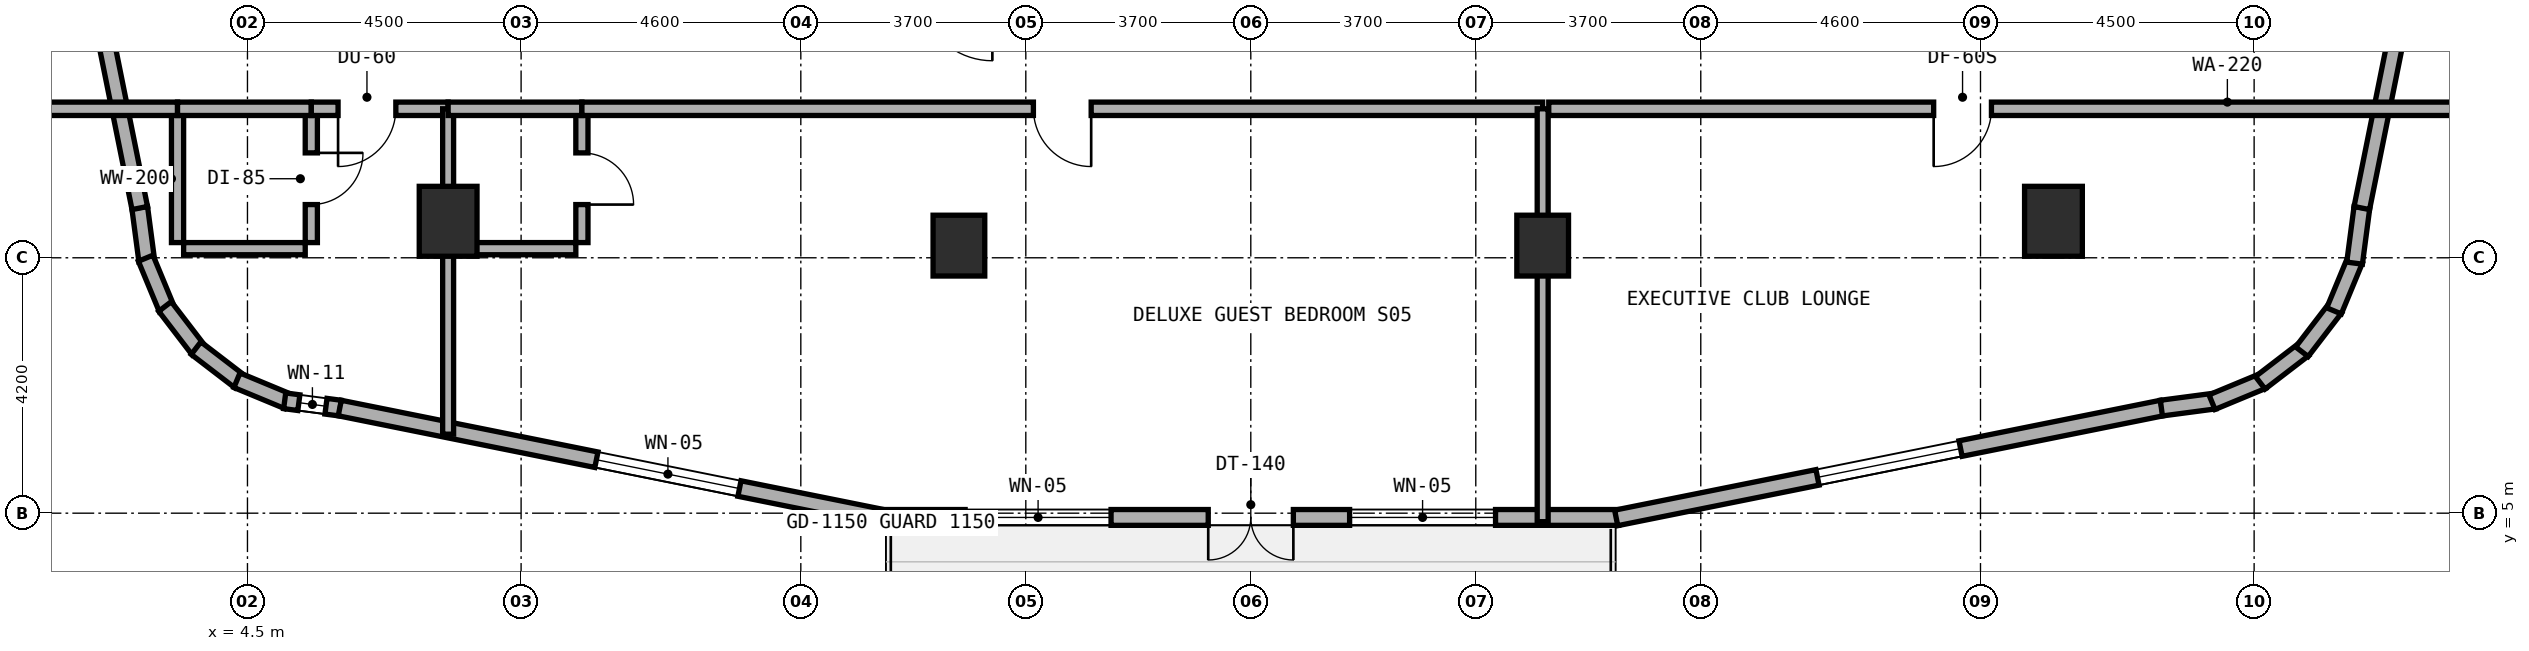
"""IFC4 building model, lengths in metres.
Left out: names, types, materials, properties, quantities, classifications, styles, units other than length and angle.
Written with IfcOpenShell. Run it as: python <this file> out.ifc"""

import sys

from ifc_helpers import new_model, si_unit, direction, frame, frame_2d, origin, origin_2d, place, context, subcontext, project, spatial, rectangle, extrude, element, fill, save


model = new_model("IFC4")
c1 = context("Model", 3, precision=1e-05, world=origin(), true_north=direction((0.0, 1.0)))
c2 = subcontext(c1, "Body", "Model", "MODEL_VIEW")
j1 = project(units=[si_unit("LENGTHUNIT", "METRE"), si_unit("PLANEANGLEUNIT", "RADIAN")], contexts=[c1])
p1 = place(None, origin())
s1 = spatial("IfcSite", under=j1, at=p1, CompositionType="ELEMENT")
p2 = place(p1, origin())
s2 = spatial("IfcBuilding", under=s1, at=p2, CompositionType="ELEMENT")
p3 = place(p2, frame((0.0, 0.0, 95.0)))
s3 = spatial("IfcBuildingStorey", under=s2, at=p3, CompositionType="ELEMENT", Elevation=95.0)
for number, where, z_axis, x_axis in (
    (1, (16.2, 9.4, 0.0), (0.0, 0.0, 1.0), (1.0, 0.0, 0.0)),
    (2, (25.8, 9.4, 0.0), (0.0, 0.0, 1.0), (1.0, 0.0, 0.0)),
):
    element("IfcColumn", number, at=place(p3, frame(where, z_axis=z_axis, x_axis=x_axis)), inside=s3, PredefinedType="COLUMN", context=c2, shape_type="SweptSolid", body=[
        extrude(rectangle(XDim=0.85, YDim=1.0, at=origin_2d()), origin(), (0.0, 0.0, 1.0), 3.5),
    ])
for number, where, z_axis, x_axis in (
    (3, (7.8, 9.8, 0.0), (0.0, 0.0, 1.0), (1.0, 0.0, 0.0)),
    (4, (34.2, 9.8, 0.0), (0.0, 0.0, 1.0), (1.0, 0.0, 0.0)),
):
    element("IfcColumn", number, at=place(p3, frame(where, z_axis=z_axis, x_axis=x_axis)), inside=s3, PredefinedType="COLUMN", context=c2, shape_type="SweptSolid", body=[
        extrude(rectangle(XDim=0.95, YDim=1.15, at=origin_2d()), origin(), (0.0, 0.0, 1.0), 3.5),
    ])
p4 = place(p3, frame((2.728, 10.025, 0.0), z_axis=(0.0, 0.0, 1.0), x_axis=(0.130953706898, -0.991388484223, 0.0)))
e5 = element("IfcWall", 5, at=p4, inside=s3, PredefinedType="STANDARD", context=c2, shape_type="SweptSolid", body=[
    extrude(rectangle(XDim=0.885, YDim=0.26, at=frame_2d((0.443, 0.0))), origin(), (0.0, 0.0, 1.0), 3.22),
])
p5 = place(p3, frame((2.826, 9.193, 0.0), z_axis=(0.0, 0.0, 1.0), x_axis=(0.383290660547, -0.923627776508, 0.0)))
e6 = element("IfcWall", 6, at=p5, inside=s3, PredefinedType="STANDARD", context=c2, shape_type="SweptSolid", body=[
    extrude(rectangle(XDim=0.903, YDim=0.26, at=frame_2d((0.452, 0.0))), origin(), (0.0, 0.0, 1.0), 3.22),
])
p6 = place(p3, frame((3.144, 8.399, 0.0), z_axis=(0.0, 0.0, 1.0), x_axis=(0.608624690463, -0.793458244748, 0.0)))
e7 = element("IfcWall", 7, at=p6, inside=s3, PredefinedType="STANDARD", context=c2, shape_type="SweptSolid", body=[
    extrude(rectangle(XDim=0.902, YDim=0.26, at=frame_2d((0.451, 0.0))), origin(), (0.0, 0.0, 1.0), 3.22),
])
p7 = place(p3, frame((3.655, 7.714, 0.0), z_axis=(0.0, 0.0, 1.0), x_axis=(0.793558456666, -0.608494022858, 0.0)))
e8 = element("IfcWall", 8, at=p7, inside=s3, PredefinedType="STANDARD", context=c2, shape_type="SweptSolid", body=[
    extrude(rectangle(XDim=0.902, YDim=0.26, at=frame_2d((0.451, 0.0))), origin(), (0.0, 0.0, 1.0), 3.22),
])
p8 = place(p3, frame((4.327, 7.186, 0.0), z_axis=(0.0, 0.0, 1.0), x_axis=(0.923683767999, -0.383155708213, 0.0)))
e9 = element("IfcWall", 9, at=p8, inside=s3, PredefinedType="STANDARD", context=c2, shape_type="SweptSolid", body=[
    extrude(rectangle(XDim=0.903, YDim=0.26, at=frame_2d((0.451, 0.0))), origin(), (0.0, 0.0, 1.0), 3.22),
])
p9 = place(p3, frame((5.112, 6.848, 0.0), z_axis=(0.0, 0.0, 1.0), x_axis=(0.991487658083, -0.130200706103, 0.0)))
e10 = element("IfcWall", 10, at=p9, inside=s3, PredefinedType="STANDARD", context=c2, shape_type="SweptSolid", body=[
    extrude(rectangle(XDim=0.921, YDim=0.26, at=frame_2d((0.46, 0.0))), origin(), (0.0, 0.0, 1.0), 3.22),
])
p10 = place(p9, frame((0.235, 0.0, 0.85)))
e11 = element("IfcOpeningElement", 11, at=p10, cuts=e10, PredefinedType="OPENING", context=c2, shape_type="SweptSolid", body=[
    extrude(rectangle(XDim=0.45, YDim=1.5, at=frame_2d((0.225, 0.75))), frame((0.0, 0.14, 0.0), z_axis=(0.0, -1.0, 0.0), x_axis=(1.0, 0.0, 0.0)), (0.0, 0.0, 1.0), 0.28),
])
p11 = place(p3, frame((6.018, 6.729, 0.0), z_axis=(0.0, 0.0, 1.0), x_axis=(0.980317172899, -0.197429077186, 0.0)))
e12 = element("IfcWall", 12, at=p11, inside=s3, PredefinedType="STANDARD", context=c2, shape_type="SweptSolid", body=[
    extrude(rectangle(XDim=9.117, YDim=0.26, at=frame_2d((4.559, 0.0))), origin(), (0.0, 0.0, 1.0), 3.22),
])
p12 = place(p11, frame((4.305, 0.0, 0.8)))
e13 = element("IfcOpeningElement", 13, at=p12, cuts=e12, PredefinedType="OPENING", context=c2, shape_type="SweptSolid", body=[
    extrude(rectangle(XDim=2.4, YDim=1.6, at=frame_2d((1.2, 0.8))), frame((0.0, 0.14, 0.0), z_axis=(0.0, -1.0, 0.0), x_axis=(1.0, 0.0, 0.0)), (0.0, 0.0, 1.0), 0.28),
])
p13 = place(p3, frame((14.915, 4.93, 0.0), z_axis=(0.0, 0.0, 1.0), x_axis=(1.0, 0.0, 0.0)))
e14 = element("IfcWall", 14, at=p13, inside=s3, PredefinedType="STANDARD", context=c2, shape_type="SweptSolid", body=[
    extrude(rectangle(XDim=12.135, YDim=0.26, at=frame_2d((6.067, 0.0))), origin(), (0.0, 0.0, 1.0), 3.22),
])
p14 = place(p13, frame((5.385, 0.0, 0.0)))
e15 = element("IfcOpeningElement", 15, at=p14, cuts=e14, PredefinedType="OPENING", context=c2, shape_type="SweptSolid", body=[
    extrude(rectangle(XDim=1.4, YDim=2.15, at=frame_2d((0.7, 1.075))), frame((0.0, 0.14, 0.0), z_axis=(0.0, -1.0, 0.0), x_axis=(1.0, 0.0, 0.0)), (0.0, 0.0, 1.0), 0.28),
])
p15 = place(p13, frame((1.387, 0.0, 0.8)))
e16 = element("IfcOpeningElement", 16, at=p15, cuts=e14, PredefinedType="OPENING", context=c2, shape_type="SweptSolid", body=[
    extrude(rectangle(XDim=2.4, YDim=1.6, at=frame_2d((1.2, 0.8))), frame((0.0, 0.14, 0.0), z_axis=(0.0, -1.0, 0.0), x_axis=(1.0, 0.0, 0.0)), (0.0, 0.0, 1.0), 0.28),
])
p16 = place(p13, frame((7.71, 0.0, 0.8)))
e17 = element("IfcOpeningElement", 17, at=p16, cuts=e14, PredefinedType="OPENING", context=c2, shape_type="SweptSolid", body=[
    extrude(rectangle(XDim=2.4, YDim=1.6, at=frame_2d((1.2, 0.8))), frame((0.0, 0.14, 0.0), z_axis=(0.0, -1.0, 0.0), x_axis=(1.0, 0.0, 0.0)), (0.0, 0.0, 1.0), 0.28),
])
p17 = place(p3, frame((27.009, 4.922, 0.0), z_axis=(0.0, 0.0, 1.0), x_axis=(0.980321298532, 0.197408590603, 0.0)))
e18 = element("IfcWall", 18, at=p17, inside=s3, PredefinedType="STANDARD", context=c2, shape_type="SweptSolid", body=[
    extrude(rectangle(XDim=9.153, YDim=0.26, at=frame_2d((4.577, 0.0))), origin(), (0.0, 0.0, 1.0), 3.22),
])
p18 = place(p17, frame((3.377, 0.0, 0.8)))
e19 = element("IfcOpeningElement", 19, at=p18, cuts=e18, PredefinedType="OPENING", context=c2, shape_type="SweptSolid", body=[
    extrude(rectangle(XDim=2.4, YDim=1.6, at=frame_2d((1.2, 0.8))), frame((0.0, 0.14, 0.0), z_axis=(0.0, -1.0, 0.0), x_axis=(1.0, 0.0, 0.0)), (0.0, 0.0, 1.0), 0.28),
])
p19 = place(p3, frame((35.975, 6.728, 0.0), z_axis=(0.0, 0.0, 1.0), x_axis=(0.991388484223, 0.130953706898, 0.0)))
e20 = element("IfcWall", 20, at=p19, inside=s3, PredefinedType="STANDARD", context=c2, shape_type="SweptSolid", body=[
    extrude(rectangle(XDim=0.885, YDim=0.26, at=frame_2d((0.443, 0.0))), origin(), (0.0, 0.0, 1.0), 3.22),
])
p20 = place(p3, frame((36.807, 6.826, 0.0), z_axis=(0.0, 0.0, 1.0), x_axis=(0.923627776508, 0.383290660547, 0.0)))
e21 = element("IfcWall", 21, at=p20, inside=s3, PredefinedType="STANDARD", context=c2, shape_type="SweptSolid", body=[
    extrude(rectangle(XDim=0.903, YDim=0.26, at=frame_2d((0.452, 0.0))), origin(), (0.0, 0.0, 1.0), 3.22),
])
p21 = place(p3, frame((37.601, 7.144, 0.0), z_axis=(0.0, 0.0, 1.0), x_axis=(0.793458244748, 0.608624690463, 0.0)))
e22 = element("IfcWall", 22, at=p21, inside=s3, PredefinedType="STANDARD", context=c2, shape_type="SweptSolid", body=[
    extrude(rectangle(XDim=0.902, YDim=0.26, at=frame_2d((0.451, 0.0))), origin(), (0.0, 0.0, 1.0), 3.22),
])
p22 = place(p3, frame((38.286, 7.655, 0.0), z_axis=(0.0, 0.0, 1.0), x_axis=(0.608494022858, 0.793558456666, 0.0)))
e23 = element("IfcWall", 23, at=p22, inside=s3, PredefinedType="STANDARD", context=c2, shape_type="SweptSolid", body=[
    extrude(rectangle(XDim=0.902, YDim=0.26, at=frame_2d((0.451, 0.0))), origin(), (0.0, 0.0, 1.0), 3.22),
])
p23 = place(p3, frame((38.814, 8.327, 0.0), z_axis=(0.0, 0.0, 1.0), x_axis=(0.383155708213, 0.923683767999, 0.0)))
e24 = element("IfcWall", 24, at=p23, inside=s3, PredefinedType="STANDARD", context=c2, shape_type="SweptSolid", body=[
    extrude(rectangle(XDim=0.903, YDim=0.26, at=frame_2d((0.451, 0.0))), origin(), (0.0, 0.0, 1.0), 3.22),
])
p24 = place(p3, frame((39.152, 9.112, 0.0), z_axis=(0.0, 0.0, 1.0), x_axis=(0.130200706103, 0.991487658083, 0.0)))
e25 = element("IfcWall", 25, at=p24, inside=s3, PredefinedType="STANDARD", context=c2, shape_type="SweptSolid", body=[
    extrude(rectangle(XDim=0.921, YDim=0.26, at=frame_2d((0.46, 0.0))), origin(), (0.0, 0.0, 1.0), 3.22),
])
p25 = place(p3, frame((39.271, 10.018, 0.0), z_axis=(0.0, 0.0, 1.0), x_axis=(0.197435082048, 0.980315963543, 0.0)))
e26 = element("IfcWall", 26, at=p25, inside=s3, PredefinedType="STANDARD", context=c2, shape_type="SweptSolid", body=[
    extrude(rectangle(XDim=9.183, YDim=0.26, at=frame_2d((4.591, 0.0))), origin(), (0.0, 0.0, 1.0), 3.22),
])
p26 = place(p25, frame((4.286, 0.0, 0.8)))
e27 = element("IfcOpeningElement", 27, at=p26, cuts=e26, PredefinedType="OPENING", context=c2, shape_type="SweptSolid", body=[
    extrude(rectangle(XDim=2.4, YDim=1.6, at=frame_2d((1.2, 0.8))), frame((0.0, 0.14, 0.0), z_axis=(0.0, -1.0, 0.0), x_axis=(1.0, 0.0, 0.0)), (0.0, 0.0, 1.0), 0.28),
])
p27 = place(p3, frame((0.916, 19.02, 0.0), z_axis=(0.0, 0.0, 1.0), x_axis=(0.197435082048, -0.980315963543, 0.0)))
e28 = element("IfcWall", 28, at=p27, inside=s3, PredefinedType="STANDARD", context=c2, shape_type="SweptSolid", body=[
    extrude(rectangle(XDim=9.183, YDim=0.26, at=frame_2d((4.591, 0.0))), origin(), (0.0, 0.0, 1.0), 3.22),
])
p28 = place(p27, frame((2.497, 0.0, 0.8)))
e29 = element("IfcOpeningElement", 29, at=p28, cuts=e28, PredefinedType="OPENING", context=c2, shape_type="SweptSolid", body=[
    extrude(rectangle(XDim=2.4, YDim=1.6, at=frame_2d((1.2, 0.8))), frame((0.0, 0.14, 0.0), z_axis=(0.0, -1.0, 0.0), x_axis=(1.0, 0.0, 0.0)), (0.0, 0.0, 1.0), 0.28),
])
p29 = place(p3, frame((5.55, 9.45, 0.0), z_axis=(0.0, 0.0, 1.0), x_axis=(0.0, 1.0, 0.0)))
e30 = element("IfcWall", 30, at=p29, inside=s3, PredefinedType="PLUMBINGWALL", context=c2, shape_type="SweptSolid", body=[
    extrude(rectangle(XDim=2.1, YDim=0.2, at=frame_2d((1.05, 0.0))), origin(), (0.0, 0.0, 1.0), 3.22),
])
p30 = place(p29, frame((0.625, 0.0, 0.0)))
e31 = element("IfcOpeningElement", 31, at=p30, cuts=e30, PredefinedType="OPENING", context=c2, shape_type="SweptSolid", body=[
    extrude(rectangle(XDim=0.85, YDim=2.1, at=frame_2d((0.425, 1.05))), frame((0.0, 0.11, 0.0), z_axis=(0.0, -1.0, 0.0), x_axis=(1.0, 0.0, 0.0)), (0.0, 0.0, 1.0), 0.22),
])
p31 = place(p3, frame((3.45, 9.35, 0.0), z_axis=(0.0, 0.0, 1.0), x_axis=(1.0, 0.0, 0.0)))
e32 = element("IfcWall", 32, at=p31, inside=s3, PredefinedType="PLUMBINGWALL", context=c2, shape_type="SweptSolid", body=[
    extrude(rectangle(XDim=2.0, YDim=0.2, at=frame_2d((1.0, 0.0))), origin(), (0.0, 0.0, 1.0), 3.22),
])
p32 = place(p3, frame((3.35, 9.45, 0.0), z_axis=(0.0, 0.0, 1.0), x_axis=(0.0, 1.0, 0.0)))
e33 = element("IfcWall", 33, at=p32, inside=s3, PredefinedType="PLUMBINGWALL", context=c2, shape_type="SweptSolid", body=[
    extrude(rectangle(XDim=2.1, YDim=0.2, at=frame_2d((1.05, 0.0))), origin(), (0.0, 0.0, 1.0), 3.22),
])
p33 = place(p3, frame((0.96, 11.65, 0.0), z_axis=(0.0, 0.0, 1.0), x_axis=(1.0, 0.0, 0.0)))
e34 = element("IfcWall", 34, at=p33, inside=s3, PredefinedType="SOLIDWALL", context=c2, shape_type="SweptSolid", body=[
    extrude(rectangle(XDim=2.39, YDim=0.22, at=frame_2d((1.195, 0.0))), origin(), (0.0, 0.0, 1.0), 3.22),
])
p34 = place(p3, frame((3.35, 11.65, 0.0), z_axis=(0.0, 0.0, 1.0), x_axis=(1.0, 0.0, 0.0)))
e35 = element("IfcWall", 35, at=p34, inside=s3, PredefinedType="SOLIDWALL", context=c2, shape_type="SweptSolid", body=[
    extrude(rectangle(XDim=2.2, YDim=0.22, at=frame_2d((1.1, 0.0))), origin(), (0.0, 0.0, 1.0), 3.22),
])
p35 = place(p3, frame((5.55, 11.65, 0.0), z_axis=(0.0, 0.0, 1.0), x_axis=(1.0, 0.0, 0.0)))
e36 = element("IfcWall", 36, at=p35, inside=s3, PredefinedType="SOLIDWALL", context=c2, shape_type="SweptSolid", body=[
    extrude(rectangle(XDim=2.25, YDim=0.22, at=frame_2d((1.125, 0.0))), origin(), (0.0, 0.0, 1.0), 2.595),
])
p36 = place(p35, frame((0.44, 0.0, 0.0)))
e37 = element("IfcOpeningElement", 37, at=p36, cuts=e36, PredefinedType="OPENING", context=c2, shape_type="SweptSolid", body=[
    extrude(rectangle(XDim=0.95, YDim=2.1, at=frame_2d((0.475, 1.05))), frame((0.0, 0.12, 0.0), z_axis=(0.0, -1.0, 0.0), x_axis=(1.0, 0.0, 0.0)), (0.0, 0.0, 1.0), 0.24),
])
p37 = place(p3, frame((7.8, 6.299, 0.0), z_axis=(0.0, 0.0, 1.0), x_axis=(0.0, 1.0, 0.0)))
e38 = element("IfcWall", 38, at=p37, inside=s3, PredefinedType="SOLIDWALL", context=c2, shape_type="SweptSolid", body=[
    extrude(rectangle(XDim=5.351, YDim=0.18, at=frame_2d((2.675, 0.0))), origin(), (0.0, 0.0, 1.0), 2.595),
])
p38 = place(p3, frame((10.0, 9.45, 0.0), z_axis=(0.0, 0.0, 1.0), x_axis=(0.0, 1.0, 0.0)))
e39 = element("IfcWall", 39, at=p38, inside=s3, PredefinedType="PLUMBINGWALL", context=c2, shape_type="SweptSolid", body=[
    extrude(rectangle(XDim=2.1, YDim=0.2, at=frame_2d((1.05, 0.0))), origin(), (0.0, 0.0, 1.0), 2.835),
])
p39 = place(p38, frame((0.625, 0.0, 0.0)))
e40 = element("IfcOpeningElement", 40, at=p39, cuts=e39, PredefinedType="OPENING", context=c2, shape_type="SweptSolid", body=[
    extrude(rectangle(XDim=0.85, YDim=2.1, at=frame_2d((0.425, 1.05))), frame((0.0, 0.11, 0.0), z_axis=(0.0, -1.0, 0.0), x_axis=(1.0, 0.0, 0.0)), (0.0, 0.0, 1.0), 0.22),
])
p40 = place(p3, frame((7.9, 9.35, 0.0), z_axis=(0.0, 0.0, 1.0), x_axis=(1.0, 0.0, 0.0)))
e41 = element("IfcWall", 41, at=p40, inside=s3, PredefinedType="PLUMBINGWALL", context=c2, shape_type="SweptSolid", body=[
    extrude(rectangle(XDim=2.0, YDim=0.2, at=frame_2d((1.0, 0.0))), origin(), (0.0, 0.0, 1.0), 3.22),
])
p41 = place(p3, frame((7.8, 11.65, 0.0), z_axis=(0.0, 0.0, 1.0), x_axis=(1.0, 0.0, 0.0)))
e42 = element("IfcWall", 42, at=p41, inside=s3, PredefinedType="SOLIDWALL", context=c2, shape_type="SweptSolid", body=[
    extrude(rectangle(XDim=2.2, YDim=0.22, at=frame_2d((1.1, 0.0))), origin(), (0.0, 0.0, 1.0), 2.595),
])
p42 = place(p3, frame((10.0, 11.65, 0.0), z_axis=(0.0, 0.0, 1.0), x_axis=(1.0, 0.0, 0.0)))
e43 = element("IfcWall", 43, at=p42, inside=s3, PredefinedType="SOLIDWALL", context=c2, shape_type="SweptSolid", body=[
    extrude(rectangle(XDim=15.8, YDim=0.22, at=frame_2d((7.9, 0.0))), origin(), (0.0, 0.0, 1.0), 2.595),
])
p43 = place(p42, frame((7.425, 0.0, 0.0)))
e44 = element("IfcOpeningElement", 44, at=p43, cuts=e43, PredefinedType="OPENING", context=c2, shape_type="SweptSolid", body=[
    extrude(rectangle(XDim=0.95, YDim=2.1, at=frame_2d((0.475, 1.05))), frame((0.0, 0.12, 0.0), z_axis=(0.0, -1.0, 0.0), x_axis=(1.0, 0.0, 0.0)), (0.0, 0.0, 1.0), 0.24),
])
p44 = place(p3, frame((25.8, 4.86, 0.0), z_axis=(0.0, 0.0, 1.0), x_axis=(0.0, 1.0, 0.0)))
e45 = element("IfcWall", 45, at=p44, inside=s3, PredefinedType="SOLIDWALL", context=c2, shape_type="SweptSolid", body=[
    extrude(rectangle(XDim=6.79, YDim=0.18, at=frame_2d((3.395, 0.0))), origin(), (0.0, 0.0, 1.0), 2.595),
])
p45 = place(p3, frame((25.9, 11.65, 0.0), z_axis=(0.0, 0.0, 1.0), x_axis=(1.0, 0.0, 0.0)))
e46 = element("IfcWall", 46, at=p45, inside=s3, PredefinedType="SOLIDWALL", context=c2, shape_type="SweptSolid", body=[
    extrude(rectangle(XDim=15.04, YDim=0.22, at=frame_2d((7.52, 0.0))), origin(), (0.0, 0.0, 1.0), 2.595),
])
p46 = place(p45, frame((6.33, 0.0, 0.0)))
e47 = element("IfcOpeningElement", 47, at=p46, cuts=e46, PredefinedType="OPENING", context=c2, shape_type="SweptSolid", body=[
    extrude(rectangle(XDim=0.95, YDim=2.1, at=frame_2d((0.475, 1.05))), frame((0.0, 0.12, 0.0), z_axis=(0.0, -1.0, 0.0), x_axis=(1.0, 0.0, 0.0)), (0.0, 0.0, 1.0), 0.24),
])
p47 = place(p12, origin())
e48 = element("IfcWindow", 48, at=p47, inside=s3, PartitioningType="SINGLE_PANEL", PredefinedType="WINDOW", context=c2, shape_type="SweptSolid", body=[
    extrude(rectangle(XDim=2.4, YDim=1.6, at=frame_2d((1.2, 0.8))), frame((0.0, 0.03, 0.0), z_axis=(0.0, -1.0, 0.0), x_axis=(1.0, 0.0, 0.0)), (0.0, 0.0, 1.0), 0.06),
])
fill(e13, e48)
p48 = place(p14, frame((1.4, 0.0, 0.0), z_axis=(0.0, 0.0, 1.0), x_axis=(-1.0, 0.0, 0.0)))
e49 = element("IfcDoor", 49, at=p48, inside=s3, OperationType="DOUBLE_DOOR_SINGLE_SWING", PredefinedType="DOOR", context=c2, shape_type="SweptSolid", body=[
    extrude(rectangle(XDim=1.4, YDim=2.15, at=frame_2d((0.7, 1.075))), frame((0.0, 0.025, 0.0), z_axis=(0.0, -1.0, 0.0), x_axis=(1.0, 0.0, 0.0)), (0.0, 0.0, 1.0), 0.05),
])
fill(e15, e49)
p49 = place(p15, origin())
e50 = element("IfcWindow", 50, at=p49, inside=s3, PartitioningType="SINGLE_PANEL", PredefinedType="WINDOW", context=c2, shape_type="SweptSolid", body=[
    extrude(rectangle(XDim=2.4, YDim=1.6, at=frame_2d((1.2, 0.8))), frame((0.0, 0.03, 0.0), z_axis=(0.0, -1.0, 0.0), x_axis=(1.0, 0.0, 0.0)), (0.0, 0.0, 1.0), 0.06),
])
fill(e16, e50)
p50 = place(p16, origin())
e51 = element("IfcWindow", 51, at=p50, inside=s3, PartitioningType="SINGLE_PANEL", PredefinedType="WINDOW", context=c2, shape_type="SweptSolid", body=[
    extrude(rectangle(XDim=2.4, YDim=1.6, at=frame_2d((1.2, 0.8))), frame((0.0, 0.03, 0.0), z_axis=(0.0, -1.0, 0.0), x_axis=(1.0, 0.0, 0.0)), (0.0, 0.0, 1.0), 0.06),
])
fill(e17, e51)
p51 = place(p18, origin())
e52 = element("IfcWindow", 52, at=p51, inside=s3, PartitioningType="SINGLE_PANEL", PredefinedType="WINDOW", context=c2, shape_type="SweptSolid", body=[
    extrude(rectangle(XDim=2.4, YDim=1.6, at=frame_2d((1.2, 0.8))), frame((0.0, 0.03, 0.0), z_axis=(0.0, -1.0, 0.0), x_axis=(1.0, 0.0, 0.0)), (0.0, 0.0, 1.0), 0.06),
])
fill(e19, e52)
p52 = place(p10, origin())
e53 = element("IfcWindow", 53, at=p52, inside=s3, PartitioningType="SINGLE_PANEL", PredefinedType="WINDOW", context=c2, shape_type="SweptSolid", body=[
    extrude(rectangle(XDim=0.45, YDim=1.5, at=frame_2d((0.225, 0.75))), frame((0.0, 0.03, 0.0), z_axis=(0.0, -1.0, 0.0), x_axis=(1.0, 0.0, 0.0)), (0.0, 0.0, 1.0), 0.06),
])
fill(e11, e53)
p53 = place(p30, frame((0.85, 0.0, 0.0), z_axis=(0.0, 0.0, 1.0), x_axis=(-1.0, 0.0, 0.0)))
e54 = element("IfcDoor", 54, at=p53, inside=s3, OperationType="SINGLE_SWING_LEFT", PredefinedType="DOOR", context=c2, shape_type="SweptSolid", body=[
    extrude(rectangle(XDim=0.85, YDim=2.1, at=frame_2d((0.425, 1.05))), frame((0.0, 0.025, 0.0), z_axis=(0.0, -1.0, 0.0), x_axis=(1.0, 0.0, 0.0)), (0.0, 0.0, 1.0), 0.05),
])
fill(e31, e54)
p54 = place(p36, frame((0.95, 0.0, 0.0), z_axis=(0.0, 0.0, 1.0), x_axis=(-1.0, 0.0, 0.0)))
e55 = element("IfcDoor", 55, at=p54, inside=s3, OperationType="SINGLE_SWING_RIGHT", PredefinedType="DOOR", context=c2, shape_type="SweptSolid", body=[
    extrude(rectangle(XDim=0.95, YDim=2.1, at=frame_2d((0.475, 1.05))), frame((0.0, 0.025, 0.0), z_axis=(0.0, -1.0, 0.0), x_axis=(1.0, 0.0, 0.0)), (0.0, 0.0, 1.0), 0.05),
])
fill(e37, e55)
p55 = place(p39, frame((0.85, 0.0, 0.0), z_axis=(0.0, 0.0, 1.0), x_axis=(-1.0, 0.0, 0.0)))
e56 = element("IfcDoor", 56, at=p55, inside=s3, OperationType="SINGLE_SWING_RIGHT", PredefinedType="DOOR", context=c2, shape_type="SweptSolid", body=[
    extrude(rectangle(XDim=0.85, YDim=2.1, at=frame_2d((0.425, 1.05))), frame((0.0, 0.025, 0.0), z_axis=(0.0, -1.0, 0.0), x_axis=(1.0, 0.0, 0.0)), (0.0, 0.0, 1.0), 0.05),
])
fill(e40, e56)
p56 = place(p43, frame((0.95, 0.0, 0.0), z_axis=(0.0, 0.0, 1.0), x_axis=(-1.0, 0.0, 0.0)))
e57 = element("IfcDoor", 57, at=p56, inside=s3, OperationType="SINGLE_SWING_LEFT", PredefinedType="DOOR", context=c2, shape_type="SweptSolid", body=[
    extrude(rectangle(XDim=0.95, YDim=2.1, at=frame_2d((0.475, 1.05))), frame((0.0, 0.025, 0.0), z_axis=(0.0, -1.0, 0.0), x_axis=(1.0, 0.0, 0.0)), (0.0, 0.0, 1.0), 0.05),
])
fill(e44, e57)
p57 = place(p46, frame((0.95, 0.0, 0.0), z_axis=(0.0, 0.0, 1.0), x_axis=(-1.0, 0.0, 0.0)))
e58 = element("IfcDoor", 58, at=p57, inside=s3, OperationType="SINGLE_SWING_RIGHT", PredefinedType="DOOR", context=c2, shape_type="SweptSolid", body=[
    extrude(rectangle(XDim=0.95, YDim=2.1, at=frame_2d((0.475, 1.05))), frame((0.0, 0.025, 0.0), z_axis=(0.0, -1.0, 0.0), x_axis=(1.0, 0.0, 0.0)), (0.0, 0.0, 1.0), 0.05),
])
fill(e47, e58)
save(model, sys.argv[1])
